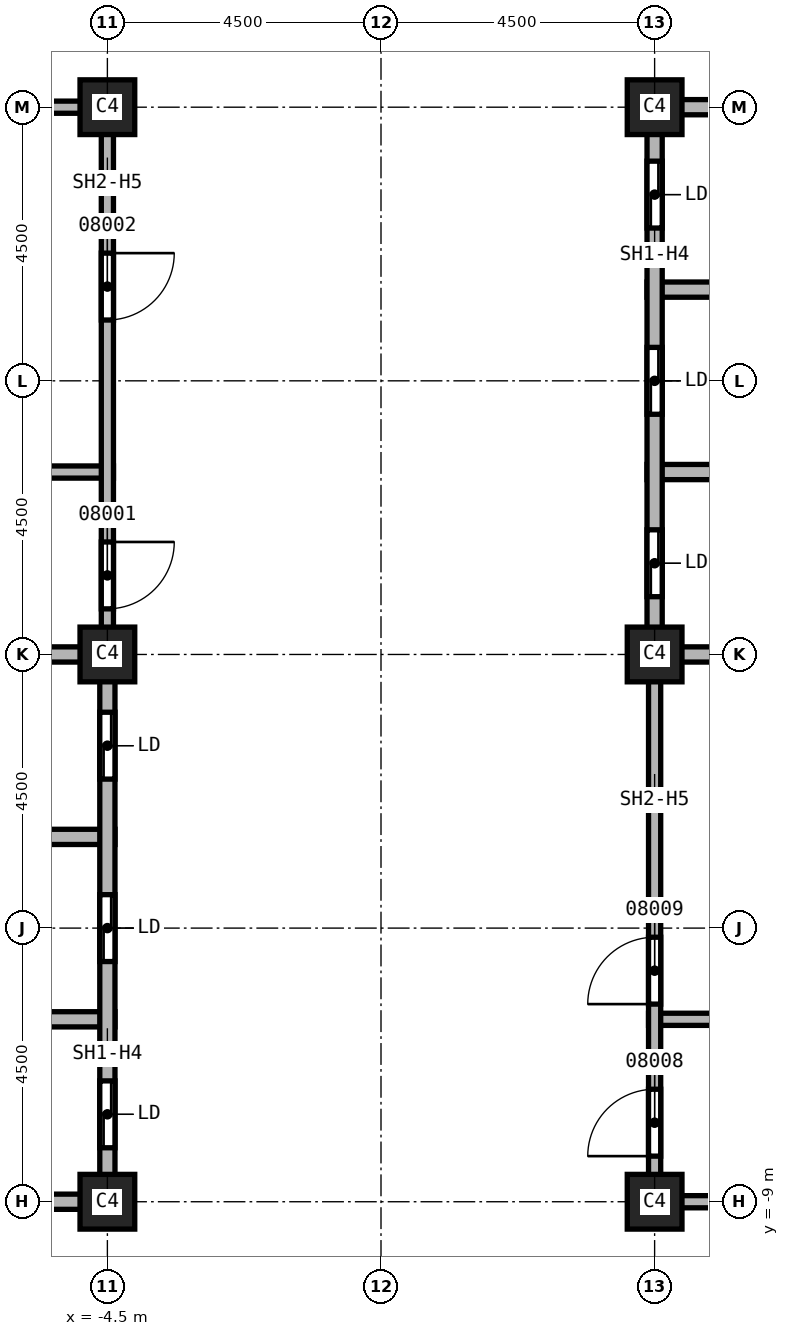
"""IFC4 building model, lengths in metres.
Left out: names, types, materials, properties, quantities, classifications, styles, units other than length and angle.
Written with IfcOpenShell. Run it as: python <this file> out.ifc"""

import sys

from ifc_helpers import new_model, si_unit, direction, frame, frame_2d, origin, origin_2d, place, context, subcontext, project, spatial, rectangle, extrude, element, fill, save


model = new_model("IFC4")
c1 = context("Model", 3, precision=1e-05, world=origin(), true_north=direction((0.0, 1.0)))
c2 = subcontext(c1, "Body", "Model", "MODEL_VIEW")
j1 = project(units=[si_unit("LENGTHUNIT", "METRE"), si_unit("PLANEANGLEUNIT", "RADIAN")], contexts=[c1])
p1 = place(None, origin())
s1 = spatial("IfcSite", under=j1, at=p1, CompositionType="ELEMENT")
p2 = place(p1, origin())
s2 = spatial("IfcBuilding", under=s1, at=p2, CompositionType="ELEMENT")
p3 = place(p2, frame((0.0, 0.0, 150.0)))
s3 = spatial("IfcBuildingStorey", under=s2, at=p3, CompositionType="ELEMENT", Elevation=150.0)
for number, where, z_axis, x_axis in (
    (1, (4.5, 0.0, 0.0), (0.0, 0.0, 1.0), (1.0, 0.0, 0.0)),
    (2, (4.5, 9.0, 0.0), (0.0, 0.0, 1.0), (1.0, 0.0, 0.0)),
    (3, (4.5, -9.0, 0.0), (0.0, 0.0, 1.0), (1.0, 0.0, 0.0)),
    (4, (-4.5, 0.0, 0.0), (0.0, 0.0, 1.0), (1.0, 0.0, 0.0)),
    (5, (-4.5, 9.0, 0.0), (0.0, 0.0, 1.0), (1.0, 0.0, 0.0)),
    (6, (-4.5, -9.0, 0.0), (0.0, 0.0, 1.0), (1.0, 0.0, 0.0)),
):
    element("IfcColumn", number, at=place(p3, frame(where, z_axis=z_axis, x_axis=x_axis)), inside=s3, PredefinedType="COLUMN", context=c2, shape_type="SweptSolid", body=[
        extrude(rectangle(XDim=0.9, YDim=0.9, at=origin_2d()), origin(), (0.0, 0.0, 1.0), 3.7),
    ])
p4 = place(p3, frame((-7.625, 3.0, 0.0), z_axis=(0.0, 0.0, 1.0), x_axis=(1.0, 0.0, 0.0)))
e7 = element("IfcWall", 7, at=p4, inside=s3, PredefinedType="SOLIDWALL", context=c2, shape_type="SweptSolid", body=[
    extrude(rectangle(XDim=3.225, YDim=0.2, at=frame_2d((1.613, 0.0))), origin(), (0.0, 0.0, 1.0), 3.7),
])
p5 = place(p3, frame((-7.5, 9.0, 0.0), z_axis=(0.0, 0.0, 1.0), x_axis=(1.0, 0.0, 0.0)))
e8 = element("IfcWall", 8, at=p5, inside=s3, PredefinedType="SOLIDWALL", context=c2, shape_type="SweptSolid", body=[
    extrude(rectangle(XDim=3.0, YDim=0.2, at=frame_2d((1.5, 0.0))), origin(), (0.0, 0.0, 1.0), 2.938),
])
p6 = place(p3, frame((-4.5, 9.1, 0.0), z_axis=(0.0, 0.0, 1.0), x_axis=(0.0, -1.0, 0.0)))
e9 = element("IfcWall", 9, at=p6, inside=s3, PredefinedType="SOLIDWALL", context=c2, shape_type="SweptSolid", body=[
    extrude(rectangle(XDim=9.1, YDim=0.2, at=frame_2d((4.55, 0.0))), origin(), (0.0, 0.0, 1.0), 2.938),
])
p7 = place(p6, frame((7.25, 0.0, 0.0)))
e10 = element("IfcOpeningElement", 10, at=p7, cuts=e9, PredefinedType="OPENING", context=c2, shape_type="SweptSolid", body=[
    extrude(rectangle(XDim=1.1, YDim=2.1, at=frame_2d((0.55, 1.05))), frame((0.0, 0.1, 0.0), z_axis=(0.0, -1.0, 0.0), x_axis=(1.0, 0.0, 0.0)), (0.0, 0.0, 1.0), 0.2),
])
p8 = place(p6, frame((2.5, 0.0, 0.0)))
e11 = element("IfcOpeningElement", 11, at=p8, cuts=e9, PredefinedType="OPENING", context=c2, shape_type="SweptSolid", body=[
    extrude(rectangle(XDim=1.1, YDim=2.1, at=frame_2d((0.55, 1.05))), frame((0.0, 0.1, 0.0), z_axis=(0.0, -1.0, 0.0), x_axis=(1.0, 0.0, 0.0)), (0.0, 0.0, 1.0), 0.2),
])
p9 = place(p3, frame((4.4, -6.0, 0.0), z_axis=(0.0, 0.0, 1.0), x_axis=(1.0, 0.0, 0.0)))
e12 = element("IfcWall", 12, at=p9, inside=s3, PredefinedType="SOLIDWALL", context=c2, shape_type="SweptSolid", body=[
    extrude(rectangle(XDim=3.2, YDim=0.2, at=frame_2d((1.6, 0.0))), origin(), (0.0, 0.0, 1.0), 3.7),
])
p10 = place(p3, frame((4.5, -9.1, 0.0), z_axis=(0.0, 0.0, 1.0), x_axis=(0.0, 1.0, 0.0)))
e13 = element("IfcWall", 13, at=p10, inside=s3, PredefinedType="SOLIDWALL", context=c2, shape_type="SweptSolid", body=[
    extrude(rectangle(XDim=9.1, YDim=0.2, at=frame_2d((4.55, 0.0))), origin(), (0.0, 0.0, 1.0), 2.938),
])
p11 = place(p10, frame((0.85, 0.0, 0.0)))
e14 = element("IfcOpeningElement", 14, at=p11, cuts=e13, PredefinedType="OPENING", context=c2, shape_type="SweptSolid", body=[
    extrude(rectangle(XDim=1.1, YDim=2.1, at=frame_2d((0.55, 1.05))), frame((0.0, 0.1, 0.0), z_axis=(0.0, -1.0, 0.0), x_axis=(1.0, 0.0, 0.0)), (0.0, 0.0, 1.0), 0.2),
])
p12 = place(p10, frame((3.35, 0.0, 0.0)))
e15 = element("IfcOpeningElement", 15, at=p12, cuts=e13, PredefinedType="OPENING", context=c2, shape_type="SweptSolid", body=[
    extrude(rectangle(XDim=1.1, YDim=2.1, at=frame_2d((0.55, 1.05))), frame((0.0, 0.1, 0.0), z_axis=(0.0, -1.0, 0.0), x_axis=(1.0, 0.0, 0.0)), (0.0, 0.0, 1.0), 0.2),
])
p13 = place(p3, frame((7.5, -9.0, 0.0), z_axis=(0.0, 0.0, 1.0), x_axis=(-1.0, 0.0, 0.0)))
e16 = element("IfcWall", 16, at=p13, inside=s3, PredefinedType="SOLIDWALL", context=c2, shape_type="SweptSolid", body=[
    extrude(rectangle(XDim=3.0, YDim=0.2, at=frame_2d((1.5, 0.0))), origin(), (0.0, 0.0, 1.0), 2.938),
])
p14 = place(p3, frame((-13.625, -3.0, 0.0), z_axis=(0.0, 0.0, 1.0), x_axis=(1.0, 0.0, 0.0)))
e17 = element("IfcWall", 17, at=p14, inside=s3, PredefinedType="SOLIDWALL", context=c2, shape_type="SweptSolid", body=[
    extrude(rectangle(XDim=9.25, YDim=0.25, at=frame_2d((4.625, 0.0))), origin(), (0.0, 0.0, 1.0), 3.7),
])
p15 = place(p14, frame((3.25, 0.0, 0.0)))
e18 = element("IfcOpeningElement", 18, at=p15, cuts=e17, PredefinedType="OPENING", context=c2, shape_type="SweptSolid", body=[
    extrude(rectangle(XDim=1.1, YDim=2.1, at=frame_2d((0.55, 1.05))), frame((0.0, 0.125, 0.0), z_axis=(0.0, -1.0, 0.0), x_axis=(1.0, 0.0, 0.0)), (0.0, 0.0, 1.0), 0.25),
])
for number, where, z_axis, x_axis in (
    (19, (-7.625, -6.0, 0.0), (0.0, 0.0, 1.0), (1.0, 0.0, 0.0)),
    (20, (-7.625, 0.0, 0.0), (0.0, 0.0, 1.0), (1.0, 0.0, 0.0)),
):
    element("IfcWall", number, at=place(p3, frame(where, z_axis=z_axis, x_axis=x_axis)), inside=s3, PredefinedType="SOLIDWALL", context=c2, shape_type="SweptSolid", body=[
        extrude(rectangle(XDim=3.25, YDim=0.25, at=frame_2d((1.625, 0.0))), origin(), (0.0, 0.0, 1.0), 3.7),
    ])
p16 = place(p3, frame((-4.5, -9.0, 0.0), z_axis=(0.0, 0.0, 1.0), x_axis=(-1.0, 0.0, 0.0)))
e21 = element("IfcWall", 21, at=p16, inside=s3, PredefinedType="SOLIDWALL", context=c2, shape_type="SweptSolid", body=[
    extrude(rectangle(XDim=3.0, YDim=0.25, at=frame_2d((1.5, 0.0))), origin(), (0.0, 0.0, 1.0), 2.938),
])
p17 = place(p3, frame((-4.5, 0.0, 0.0), z_axis=(0.0, 0.0, 1.0), x_axis=(0.0, -1.0, 0.0)))
e22 = element("IfcWall", 22, at=p17, inside=s3, PredefinedType="SOLIDWALL", context=c2, shape_type="SweptSolid", body=[
    extrude(rectangle(XDim=9.125, YDim=0.25, at=frame_2d((4.562, 0.0))), origin(), (0.0, 0.0, 1.0), 2.938),
])
p18 = place(p17, frame((7.012, 0.0, 0.0)))
e23 = element("IfcOpeningElement", 23, at=p18, cuts=e22, PredefinedType="OPENING", context=c2, shape_type="SweptSolid", body=[
    extrude(rectangle(XDim=1.1, YDim=2.1, at=frame_2d((0.55, 1.05))), frame((0.0, 0.125, 0.0), z_axis=(0.0, -1.0, 0.0), x_axis=(1.0, 0.0, 0.0)), (0.0, 0.0, 1.0), 0.25),
])
p19 = place(p17, frame((3.95, 0.0, 0.0)))
e24 = element("IfcOpeningElement", 24, at=p19, cuts=e22, PredefinedType="OPENING", context=c2, shape_type="SweptSolid", body=[
    extrude(rectangle(XDim=1.1, YDim=2.1, at=frame_2d((0.55, 1.05))), frame((0.0, 0.125, 0.0), z_axis=(0.0, -1.0, 0.0), x_axis=(1.0, 0.0, 0.0)), (0.0, 0.0, 1.0), 0.25),
])
p20 = place(p17, frame((0.95, 0.0, 0.0)))
e25 = element("IfcOpeningElement", 25, at=p20, cuts=e22, PredefinedType="OPENING", context=c2, shape_type="SweptSolid", body=[
    extrude(rectangle(XDim=1.1, YDim=2.1, at=frame_2d((0.55, 1.05))), frame((0.0, 0.125, 0.0), z_axis=(0.0, -1.0, 0.0), x_axis=(1.0, 0.0, 0.0)), (0.0, 0.0, 1.0), 0.25),
])
p21 = place(p3, frame((4.375, 0.0, 0.0), z_axis=(0.0, 0.0, 1.0), x_axis=(1.0, 0.0, 0.0)))
e26 = element("IfcWall", 26, at=p21, inside=s3, PredefinedType="SOLIDWALL", context=c2, shape_type="SweptSolid", body=[
    extrude(rectangle(XDim=3.25, YDim=0.25, at=frame_2d((1.625, 0.0))), origin(), (0.0, 0.0, 1.0), 3.7),
])
p22 = place(p3, frame((4.375, 3.0, 0.0), z_axis=(0.0, 0.0, 1.0), x_axis=(1.0, 0.0, 0.0)))
e27 = element("IfcWall", 27, at=p22, inside=s3, PredefinedType="SOLIDWALL", context=c2, shape_type="SweptSolid", body=[
    extrude(rectangle(XDim=9.25, YDim=0.25, at=frame_2d((4.625, 0.0))), origin(), (0.0, 0.0, 1.0), 3.7),
])
p23 = place(p22, frame((3.375, 0.0, 0.0)))
e28 = element("IfcOpeningElement", 28, at=p23, cuts=e27, PredefinedType="OPENING", context=c2, shape_type="SweptSolid", body=[
    extrude(rectangle(XDim=1.1, YDim=2.1, at=frame_2d((0.55, 1.05))), frame((0.0, 0.125, 0.0), z_axis=(0.0, -1.0, 0.0), x_axis=(1.0, 0.0, 0.0)), (0.0, 0.0, 1.0), 0.25),
])
p24 = place(p3, frame((4.375, 6.0, 0.0), z_axis=(0.0, 0.0, 1.0), x_axis=(1.0, 0.0, 0.0)))
e29 = element("IfcWall", 29, at=p24, inside=s3, PredefinedType="SOLIDWALL", context=c2, shape_type="SweptSolid", body=[
    extrude(rectangle(XDim=3.25, YDim=0.25, at=frame_2d((1.625, 0.0))), origin(), (0.0, 0.0, 1.0), 3.7),
])
p25 = place(p3, frame((4.5, 0.0, 0.0), z_axis=(0.0, 0.0, 1.0), x_axis=(0.0, 1.0, 0.0)))
e30 = element("IfcWall", 30, at=p25, inside=s3, PredefinedType="SOLIDWALL", context=c2, shape_type="SweptSolid", body=[
    extrude(rectangle(XDim=9.125, YDim=0.25, at=frame_2d((4.562, 0.0))), origin(), (0.0, 0.0, 1.0), 2.938),
])
p26 = place(p25, frame((0.95, 0.0, 0.0)))
e31 = element("IfcOpeningElement", 31, at=p26, cuts=e30, PredefinedType="OPENING", context=c2, shape_type="SweptSolid", body=[
    extrude(rectangle(XDim=1.1, YDim=2.1, at=frame_2d((0.55, 1.05))), frame((0.0, 0.125, 0.0), z_axis=(0.0, -1.0, 0.0), x_axis=(1.0, 0.0, 0.0)), (0.0, 0.0, 1.0), 0.25),
])
p27 = place(p25, frame((3.95, 0.0, 0.0)))
e32 = element("IfcOpeningElement", 32, at=p27, cuts=e30, PredefinedType="OPENING", context=c2, shape_type="SweptSolid", body=[
    extrude(rectangle(XDim=1.1, YDim=2.1, at=frame_2d((0.55, 1.05))), frame((0.0, 0.125, 0.0), z_axis=(0.0, -1.0, 0.0), x_axis=(1.0, 0.0, 0.0)), (0.0, 0.0, 1.0), 0.25),
])
p28 = place(p25, frame((7.012, 0.0, 0.0)))
e33 = element("IfcOpeningElement", 33, at=p28, cuts=e30, PredefinedType="OPENING", context=c2, shape_type="SweptSolid", body=[
    extrude(rectangle(XDim=1.1, YDim=2.1, at=frame_2d((0.55, 1.05))), frame((0.0, 0.125, 0.0), z_axis=(0.0, -1.0, 0.0), x_axis=(1.0, 0.0, 0.0)), (0.0, 0.0, 1.0), 0.25),
])
p29 = place(p3, frame((4.5, 9.0, 0.0), z_axis=(0.0, 0.0, 1.0), x_axis=(1.0, 0.0, 0.0)))
e34 = element("IfcWall", 34, at=p29, inside=s3, PredefinedType="SOLIDWALL", context=c2, shape_type="SweptSolid", body=[
    extrude(rectangle(XDim=3.0, YDim=0.25, at=frame_2d((1.5, 0.0))), origin(), (0.0, 0.0, 1.0), 2.938),
])
p30 = place(p7, origin())
e35 = element("IfcDoor", 35, at=p30, inside=s3, OperationType="SINGLE_SWING_RIGHT", PredefinedType="DOOR", context=c2, shape_type="SweptSolid", body=[
    extrude(rectangle(XDim=1.1, YDim=2.1, at=frame_2d((0.55, 1.05))), frame((0.0, 0.025, 0.0), z_axis=(0.0, -1.0, 0.0), x_axis=(1.0, 0.0, 0.0)), (0.0, 0.0, 1.0), 0.05),
])
fill(e10, e35)
p31 = place(p8, origin())
e36 = element("IfcDoor", 36, at=p31, inside=s3, OperationType="SINGLE_SWING_LEFT", PredefinedType="DOOR", context=c2, shape_type="SweptSolid", body=[
    extrude(rectangle(XDim=1.1, YDim=2.1, at=frame_2d((0.55, 1.05))), frame((0.0, 0.025, 0.0), z_axis=(0.0, -1.0, 0.0), x_axis=(1.0, 0.0, 0.0)), (0.0, 0.0, 1.0), 0.05),
])
fill(e11, e36)
p32 = place(p11, origin())
e37 = element("IfcDoor", 37, at=p32, inside=s3, OperationType="SINGLE_SWING_LEFT", PredefinedType="DOOR", context=c2, shape_type="SweptSolid", body=[
    extrude(rectangle(XDim=1.1, YDim=2.1, at=frame_2d((0.55, 1.05))), frame((0.0, 0.025, 0.0), z_axis=(0.0, -1.0, 0.0), x_axis=(1.0, 0.0, 0.0)), (0.0, 0.0, 1.0), 0.05),
])
fill(e14, e37)
p33 = place(p12, origin())
e38 = element("IfcDoor", 38, at=p33, inside=s3, OperationType="SINGLE_SWING_RIGHT", PredefinedType="DOOR", context=c2, shape_type="SweptSolid", body=[
    extrude(rectangle(XDim=1.1, YDim=2.1, at=frame_2d((0.55, 1.05))), frame((0.0, 0.025, 0.0), z_axis=(0.0, -1.0, 0.0), x_axis=(1.0, 0.0, 0.0)), (0.0, 0.0, 1.0), 0.05),
])
fill(e15, e38)
p34 = place(p18, origin())
e39 = element("IfcDoor", 39, at=p34, inside=s3, OperationType="SLIDING_TO_LEFT", PredefinedType="DOOR", context=c2, shape_type="SweptSolid", body=[
    extrude(rectangle(XDim=1.1, YDim=2.1, at=frame_2d((0.55, 1.05))), frame((0.0, 0.025, 0.0), z_axis=(0.0, -1.0, 0.0), x_axis=(1.0, 0.0, 0.0)), (0.0, 0.0, 1.0), 0.05),
])
fill(e23, e39)
p35 = place(p19, origin())
e40 = element("IfcDoor", 40, at=p35, inside=s3, OperationType="SLIDING_TO_LEFT", PredefinedType="DOOR", context=c2, shape_type="SweptSolid", body=[
    extrude(rectangle(XDim=1.1, YDim=2.1, at=frame_2d((0.55, 1.05))), frame((0.0, 0.025, 0.0), z_axis=(0.0, -1.0, 0.0), x_axis=(1.0, 0.0, 0.0)), (0.0, 0.0, 1.0), 0.05),
])
fill(e24, e40)
p36 = place(p20, origin())
e41 = element("IfcDoor", 41, at=p36, inside=s3, OperationType="SLIDING_TO_LEFT", PredefinedType="DOOR", context=c2, shape_type="SweptSolid", body=[
    extrude(rectangle(XDim=1.1, YDim=2.1, at=frame_2d((0.55, 1.05))), frame((0.0, 0.025, 0.0), z_axis=(0.0, -1.0, 0.0), x_axis=(1.0, 0.0, 0.0)), (0.0, 0.0, 1.0), 0.05),
])
fill(e25, e41)
p37 = place(p26, origin())
e42 = element("IfcDoor", 42, at=p37, inside=s3, OperationType="SLIDING_TO_LEFT", PredefinedType="DOOR", context=c2, shape_type="SweptSolid", body=[
    extrude(rectangle(XDim=1.1, YDim=2.1, at=frame_2d((0.55, 1.05))), frame((0.0, 0.025, 0.0), z_axis=(0.0, -1.0, 0.0), x_axis=(1.0, 0.0, 0.0)), (0.0, 0.0, 1.0), 0.05),
])
fill(e31, e42)
p38 = place(p27, origin())
e43 = element("IfcDoor", 43, at=p38, inside=s3, OperationType="SLIDING_TO_LEFT", PredefinedType="DOOR", context=c2, shape_type="SweptSolid", body=[
    extrude(rectangle(XDim=1.1, YDim=2.1, at=frame_2d((0.55, 1.05))), frame((0.0, 0.025, 0.0), z_axis=(0.0, -1.0, 0.0), x_axis=(1.0, 0.0, 0.0)), (0.0, 0.0, 1.0), 0.05),
])
fill(e32, e43)
p39 = place(p28, origin())
e44 = element("IfcDoor", 44, at=p39, inside=s3, OperationType="SLIDING_TO_LEFT", PredefinedType="DOOR", context=c2, shape_type="SweptSolid", body=[
    extrude(rectangle(XDim=1.1, YDim=2.1, at=frame_2d((0.55, 1.05))), frame((0.0, 0.025, 0.0), z_axis=(0.0, -1.0, 0.0), x_axis=(1.0, 0.0, 0.0)), (0.0, 0.0, 1.0), 0.05),
])
fill(e33, e44)
save(model, sys.argv[1])
